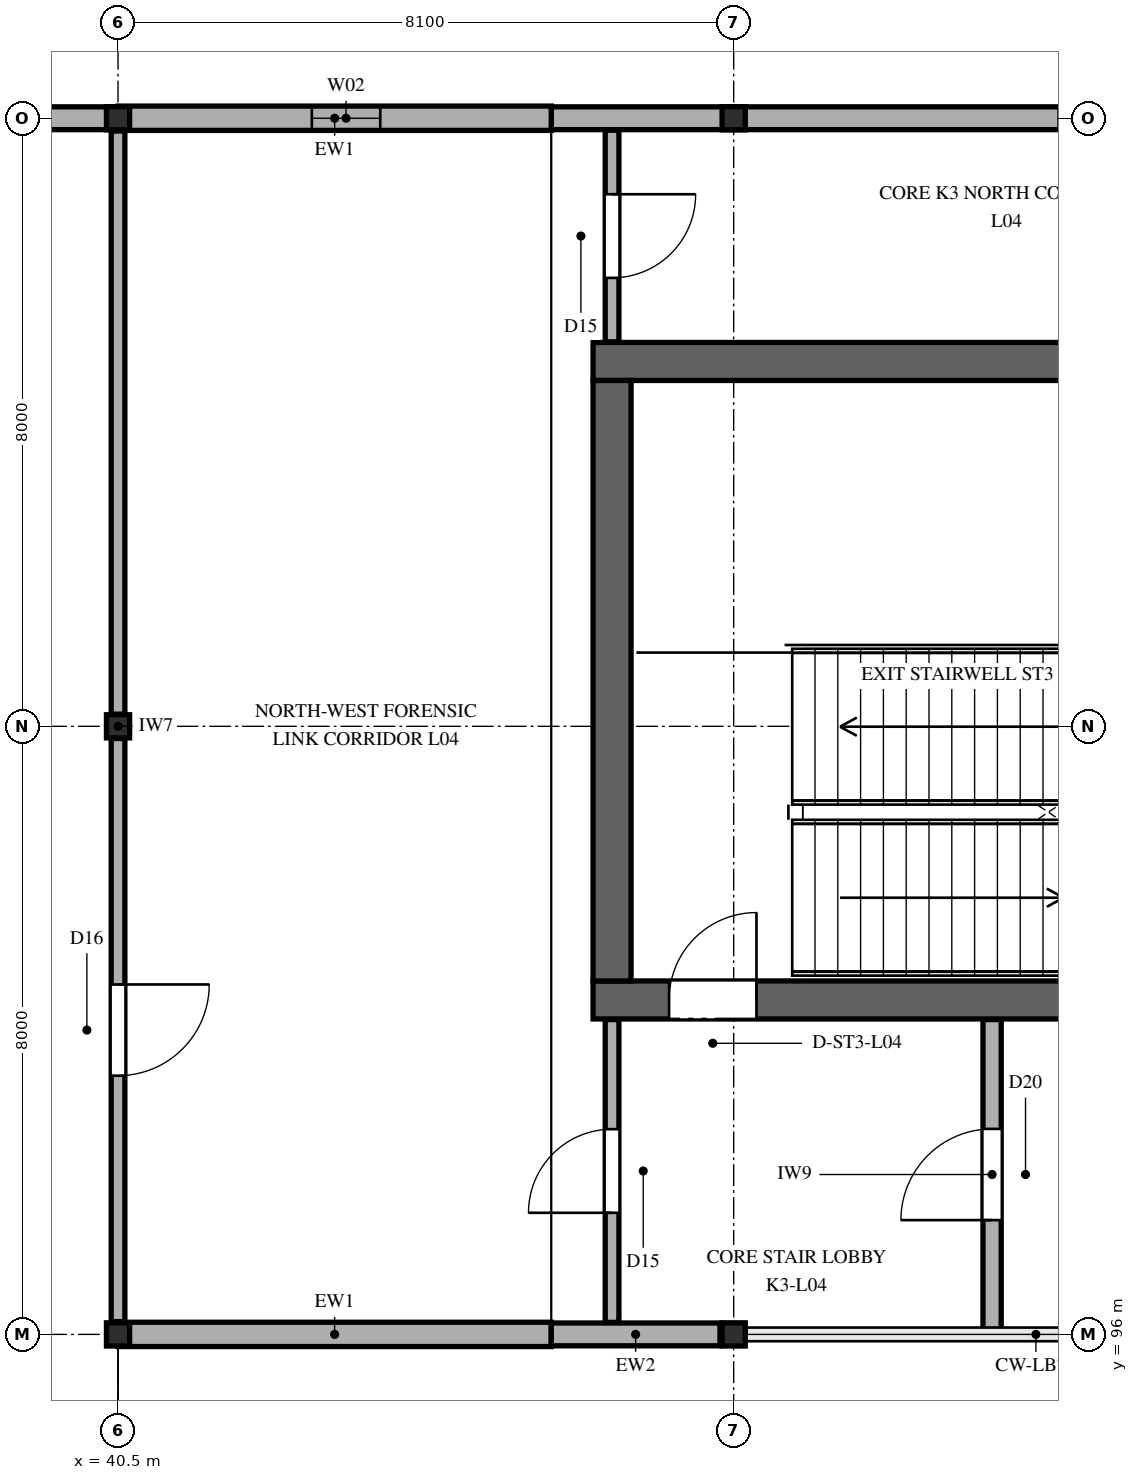
"""IFC4 building model, lengths in metres.
Left out: names, types, materials, properties, quantities, classifications, styles, units other than length and angle.
Written with IfcOpenShell. Run it as: python <this file> out.ifc"""

import sys

from ifc_helpers import new_model, si_unit, direction, frame, frame_2d, origin, origin_2d, place, context, subcontext, project, spatial, rectangle, hollow_rectangle, extrude, element, fill, save


model = new_model("IFC4")
c1 = context("Model", 3, precision=1e-05, world=origin(), true_north=direction((0.0, 1.0)))
c2 = subcontext(c1, "Body", "Model", "MODEL_VIEW")
j1 = project(units=[si_unit("LENGTHUNIT", "METRE"), si_unit("PLANEANGLEUNIT", "RADIAN")], contexts=[c1])
p1 = place(None, origin())
s1 = spatial("IfcSite", under=j1, at=p1, CompositionType="ELEMENT")
p2 = place(p1, origin())
s2 = spatial("IfcBuilding", under=s1, at=p2, CompositionType="ELEMENT")
p3 = place(p2, frame((0.0, 0.0, 19.8)))
s3 = spatial("IfcBuildingStorey", under=s2, at=p3, CompositionType="ELEMENT", Elevation=19.8)
p4 = place(p3, frame((46.75, 100.4, 0.0), z_axis=(0.0, 0.0, 1.0), x_axis=(1.0, 0.0, 0.0)))
e1 = element("IfcWall", 1, at=p4, inside=s3, PredefinedType="SHEAR", context=c2, shape_type="SweptSolid", body=[
    extrude(rectangle(XDim=15.3, YDim=0.5, at=frame_2d((7.65, 0.0))), origin(), (0.0, 0.0, 1.0), 5.1),
])
p5 = place(p4, frame((1.0, 0.0, 0.0)))
e2 = element("IfcOpeningElement", 2, at=p5, cuts=e1, PredefinedType="OPENING", context=c2, shape_type="SweptSolid", body=[
    extrude(rectangle(XDim=1.15, YDim=2.25, at=frame_2d((0.575, 1.125))), frame((0.0, 0.26, 0.0), z_axis=(0.0, -1.0, 0.0), x_axis=(1.0, 0.0, 0.0)), (0.0, 0.0, 1.0), 0.52),
])
p6 = place(p4, frame((10.282, 0.0, 0.0)))
e3 = element("IfcOpeningElement", 3, at=p6, cuts=e1, PredefinedType="OPENING", context=c2, shape_type="SweptSolid", body=[
    extrude(rectangle(XDim=1.1, YDim=2.2, at=frame_2d((0.55, 1.1))), frame((0.0, 0.26, 0.0), z_axis=(0.0, -1.0, 0.0), x_axis=(1.0, 0.0, 0.0)), (0.0, 0.0, 1.0), 0.52),
])
p7 = place(p4, frame((12.998, 0.0, 0.0)))
e4 = element("IfcOpeningElement", 4, at=p7, cuts=e1, PredefinedType="OPENING", context=c2, shape_type="SweptSolid", body=[
    extrude(rectangle(XDim=1.1, YDim=2.2, at=frame_2d((0.55, 1.1))), frame((0.0, 0.26, 0.0), z_axis=(0.0, -1.0, 0.0), x_axis=(1.0, 0.0, 0.0)), (0.0, 0.0, 1.0), 0.52),
])
p8 = place(p3, frame((46.75, 108.8, 0.0), z_axis=(0.0, 0.0, 1.0), x_axis=(1.0, 0.0, 0.0)))
e5 = element("IfcWall", 5, at=p8, inside=s3, PredefinedType="SHEAR", context=c2, shape_type="SweptSolid", body=[
    extrude(rectangle(XDim=15.3, YDim=0.5, at=frame_2d((7.65, 0.0))), origin(), (0.0, 0.0, 1.0), 5.1),
])
p9 = place(p3, frame((47.0, 100.65, 0.0), z_axis=(0.0, 0.0, 1.0), x_axis=(0.0, 1.0, 0.0)))
e6 = element("IfcWall", 6, at=p9, inside=s3, PredefinedType="SHEAR", context=c2, shape_type="SweptSolid", body=[
    extrude(rectangle(XDim=7.9, YDim=0.5, at=frame_2d((3.95, 0.0))), origin(), (0.0, 0.0, 1.0), 5.1),
])
for number, where, z_axis, x_axis in (
    (7, (40.5, 96.0, 0.0), (0.0, 0.0, 1.0), (1.0, 0.0, 0.0)),
    (8, (40.5, 104.0, 0.0), (0.0, 0.0, 1.0), (1.0, 0.0, 0.0)),
    (9, (40.5, 112.0, 0.0), (0.0, 0.0, 1.0), (1.0, 0.0, 0.0)),
    (10, (48.6, 96.0, 0.0), (0.0, 0.0, 1.0), (1.0, 0.0, 0.0)),
    (11, (48.6, 112.0, 0.0), (0.0, 0.0, 1.0), (1.0, 0.0, 0.0)),
):
    element("IfcColumn", number, at=place(p3, frame(where, z_axis=z_axis, x_axis=x_axis)), inside=s3, PredefinedType="COLUMN", context=c2, shape_type="SweptSolid", body=[
        extrude(hollow_rectangle(XDim=0.305, YDim=0.305, WallThickness=0.016, InnerFilletRadius=0.016, OuterFilletRadius=0.032, at=origin_2d()), origin(), (0.0, 0.0, 1.0), 5.1),
    ])
p10 = place(p3, frame((40.5, 96.0, 0.0), z_axis=(0.0, 0.0, 1.0), x_axis=(1.0, 0.0, 0.0)))
e12 = element("IfcWall", 12, at=p10, inside=s3, PredefinedType="SOLIDWALL", context=c2, shape_type="SweptSolid", body=[
    extrude(rectangle(XDim=5.7, YDim=0.32, at=frame_2d((2.85, 0.0))), origin(), (0.0, 0.0, 1.0), 4.302),
])
p11 = place(p3, frame((46.2, 96.0, 0.0), z_axis=(0.0, 0.0, 1.0), x_axis=(1.0, 0.0, 0.0)))
e13 = element("IfcWall", 13, at=p11, inside=s3, PredefinedType="SOLIDWALL", context=c2, shape_type="SweptSolid", body=[
    extrude(rectangle(XDim=2.22, YDim=0.3, at=frame_2d((1.11, 0.0))), origin(), (0.0, 0.0, 1.0), 4.302),
])
p12 = place(p3, frame((62.775, 112.0, 0.0), z_axis=(0.0, 0.0, 1.0), x_axis=(-1.0, 0.0, 0.0)))
e14 = element("IfcWall", 14, at=p12, inside=s3, PredefinedType="SOLIDWALL", context=c2, shape_type="SweptSolid", body=[
    extrude(rectangle(XDim=14.175, YDim=0.3, at=frame_2d((7.087, 0.0))), origin(), (0.0, 0.0, 1.0), 4.302),
])
p13 = place(p12, frame((9.0, 0.0, 0.95)))
e15 = element("IfcOpeningElement", 15, at=p13, cuts=e14, PredefinedType="OPENING", context=c2, shape_type="SweptSolid", body=[
    extrude(rectangle(XDim=0.9, YDim=1.8, at=frame_2d((0.45, 0.9))), frame((0.0, 0.16, 0.0), z_axis=(0.0, -1.0, 0.0), x_axis=(1.0, 0.0, 0.0)), (0.0, 0.0, 1.0), 0.32),
])
p14 = place(p3, frame((48.6, 112.0, 0.0), z_axis=(0.0, 0.0, 1.0), x_axis=(-1.0, 0.0, 0.0)))
e16 = element("IfcWall", 16, at=p14, inside=s3, PredefinedType="SOLIDWALL", context=c2, shape_type="SweptSolid", body=[
    extrude(rectangle(XDim=2.4, YDim=0.3, at=frame_2d((1.2, 0.0))), origin(), (0.0, 0.0, 1.0), 4.389),
])
p15 = place(p3, frame((46.2, 112.0, 0.0), z_axis=(0.0, 0.0, 1.0), x_axis=(-1.0, 0.0, 0.0)))
e17 = element("IfcWall", 17, at=p15, inside=s3, PredefinedType="SOLIDWALL", context=c2, shape_type="SweptSolid", body=[
    extrude(rectangle(XDim=5.7, YDim=0.32, at=frame_2d((2.85, 0.0))), origin(), (0.0, 0.0, 1.0), 4.389),
])
p16 = place(p15, frame((2.25, 0.0, 0.85)))
e18 = element("IfcOpeningElement", 18, at=p16, cuts=e17, PredefinedType="OPENING", context=c2, shape_type="SweptSolid", body=[
    extrude(rectangle(XDim=0.9, YDim=2.1, at=frame_2d((0.45, 1.05))), frame((0.0, 0.17, 0.0), z_axis=(0.0, -1.0, 0.0), x_axis=(1.0, 0.0, 0.0)), (0.0, 0.0, 1.0), 0.34),
])
p17 = place(p3, frame((40.5, 112.0, 0.0), z_axis=(0.0, 0.0, 1.0), x_axis=(-1.0, 0.0, 0.0)))
e19 = element("IfcWall", 19, at=p17, inside=s3, PredefinedType="SOLIDWALL", context=c2, shape_type="SweptSolid", body=[
    extrude(rectangle(XDim=12.15, YDim=0.3, at=frame_2d((6.075, 0.0))), origin(), (0.0, 0.0, 1.0), 4.302),
])
p18 = place(p17, frame((5.4, 0.0, 0.85)))
e20 = element("IfcOpeningElement", 20, at=p18, cuts=e19, PredefinedType="OPENING", context=c2, shape_type="SweptSolid", body=[
    extrude(rectangle(XDim=0.9, YDim=2.4, at=frame_2d((0.45, 1.2))), frame((0.0, 0.16, 0.0), z_axis=(0.0, -1.0, 0.0), x_axis=(1.0, 0.0, 0.0)), (0.0, 0.0, 1.0), 0.32),
])
p19 = place(p3, frame((40.5, 96.168, 0.0), z_axis=(0.0, 0.0, 1.0), x_axis=(0.0, 1.0, 0.0)))
e21 = element("IfcWall", 21, at=p19, inside=s3, PredefinedType="PARTITIONING", context=c2, shape_type="SweptSolid", body=[
    extrude(rectangle(XDim=7.672, YDim=0.18, at=frame_2d((3.836, 0.0))), origin(), (0.0, 0.0, 1.0), 4.389),
])
p20 = place(p19, frame((3.236, 0.0, 0.0)))
e22 = element("IfcOpeningElement", 22, at=p20, cuts=e21, PredefinedType="OPENING", context=c2, shape_type="SweptSolid", body=[
    extrude(rectangle(XDim=1.2, YDim=2.2, at=frame_2d((0.6, 1.1))), frame((0.0, 0.1, 0.0), z_axis=(0.0, -1.0, 0.0), x_axis=(1.0, 0.0, 0.0)), (0.0, 0.0, 1.0), 0.2),
])
p21 = place(p3, frame((40.5, 104.16, 0.0), z_axis=(0.0, 0.0, 1.0), x_axis=(0.0, 1.0, 0.0)))
e23 = element("IfcWall", 23, at=p21, inside=s3, PredefinedType="PARTITIONING", context=c2, shape_type="SweptSolid", body=[
    extrude(rectangle(XDim=7.672, YDim=0.18, at=frame_2d((3.836, 0.0))), origin(), (0.0, 0.0, 1.0), 4.389),
])
p22 = place(p3, frame((47.0, 96.158, 0.0), z_axis=(0.0, 0.0, 1.0), x_axis=(0.0, 1.0, 0.0)))
e24 = element("IfcWall", 24, at=p22, inside=s3, PredefinedType="PARTITIONING", context=c2, shape_type="SweptSolid", body=[
    extrude(rectangle(XDim=3.984, YDim=0.18, at=frame_2d((1.992, 0.0))), origin(), (0.0, 0.0, 1.0), 4.86),
])
p23 = place(p22, frame((1.442, 0.0, 0.0)))
e25 = element("IfcOpeningElement", 25, at=p23, cuts=e24, PredefinedType="OPENING", context=c2, shape_type="SweptSolid", body=[
    extrude(rectangle(XDim=1.1, YDim=2.2, at=frame_2d((0.55, 1.1))), frame((0.0, 0.1, 0.0), z_axis=(0.0, -1.0, 0.0), x_axis=(1.0, 0.0, 0.0)), (0.0, 0.0, 1.0), 0.2),
])
p24 = place(p3, frame((47.0, 109.058, 0.0), z_axis=(0.0, 0.0, 1.0), x_axis=(0.0, 1.0, 0.0)))
e26 = element("IfcWall", 26, at=p24, inside=s3, PredefinedType="PARTITIONING", context=c2, shape_type="SweptSolid", body=[
    extrude(rectangle(XDim=2.784, YDim=0.18, at=frame_2d((1.392, 0.0))), origin(), (0.0, 0.0, 1.0), 4.86),
])
p25 = place(p24, frame((0.842, 0.0, 0.0)))
e27 = element("IfcOpeningElement", 27, at=p25, cuts=e26, PredefinedType="OPENING", context=c2, shape_type="SweptSolid", body=[
    extrude(rectangle(XDim=1.1, YDim=2.2, at=frame_2d((0.55, 1.1))), frame((0.0, 0.1, 0.0), z_axis=(0.0, -1.0, 0.0), x_axis=(1.0, 0.0, 0.0)), (0.0, 0.0, 1.0), 0.2),
])
p26 = place(p3, frame((52.0, 96.065, 0.0), z_axis=(0.0, 0.0, 1.0), x_axis=(0.0, 1.0, 0.0)))
e28 = element("IfcWall", 28, at=p26, inside=s3, PredefinedType="PARTITIONING", context=c2, shape_type="SweptSolid", body=[
    extrude(rectangle(XDim=4.077, YDim=0.24, at=frame_2d((2.039, 0.0))), origin(), (0.0, 0.0, 1.0), 4.86),
])
p27 = place(p26, frame((1.438, 0.0, 0.0)))
e29 = element("IfcOpeningElement", 29, at=p27, cuts=e28, PredefinedType="OPENING", context=c2, shape_type="SweptSolid", body=[
    extrude(rectangle(XDim=1.2, YDim=2.3, at=frame_2d((0.6, 1.15))), frame((0.0, 0.13, 0.0), z_axis=(0.0, -1.0, 0.0), x_axis=(1.0, 0.0, 0.0)), (0.0, 0.0, 1.0), 0.26),
])
p28 = place(p16, origin())
e30 = element("IfcWindow", 30, at=p28, inside=s3, PartitioningType="SINGLE_PANEL", PredefinedType="WINDOW", context=c2, shape_type="SweptSolid", body=[
    extrude(rectangle(XDim=0.9, YDim=2.1, at=frame_2d((0.45, 1.05))), frame((0.0, 0.03, 0.0), z_axis=(0.0, -1.0, 0.0), x_axis=(1.0, 0.0, 0.0)), (0.0, 0.0, 1.0), 0.06),
])
fill(e18, e30)
p29 = place(p5, origin())
e31 = element("IfcDoor", 31, at=p29, inside=s3, OperationType="SINGLE_SWING_RIGHT", PredefinedType="DOOR", context=c2, shape_type="SweptSolid", body=[
    extrude(rectangle(XDim=1.15, YDim=2.25, at=frame_2d((0.575, 1.125))), frame((0.0, 0.025, 0.0), z_axis=(0.0, -1.0, 0.0), x_axis=(1.0, 0.0, 0.0)), (0.0, 0.0, 1.0), 0.05),
])
fill(e2, e31)
p30 = place(p20, frame((1.2, 0.0, 0.0), z_axis=(0.0, 0.0, 1.0), x_axis=(-1.0, 0.0, 0.0)))
e32 = element("IfcDoor", 32, at=p30, inside=s3, OperationType="SINGLE_SWING_RIGHT", PredefinedType="DOOR", context=c2, shape_type="SweptSolid", body=[
    extrude(rectangle(XDim=1.2, YDim=2.2, at=frame_2d((0.6, 1.1))), frame((0.0, 0.025, 0.0), z_axis=(0.0, -1.0, 0.0), x_axis=(1.0, 0.0, 0.0)), (0.0, 0.0, 1.0), 0.05),
])
fill(e22, e32)
p31 = place(p23, origin())
e33 = element("IfcDoor", 33, at=p31, inside=s3, OperationType="SINGLE_SWING_LEFT", PredefinedType="DOOR", context=c2, shape_type="SweptSolid", body=[
    extrude(rectangle(XDim=1.1, YDim=2.2, at=frame_2d((0.55, 1.1))), frame((0.0, 0.025, 0.0), z_axis=(0.0, -1.0, 0.0), x_axis=(1.0, 0.0, 0.0)), (0.0, 0.0, 1.0), 0.05),
])
fill(e25, e33)
p32 = place(p25, frame((1.1, 0.0, 0.0), z_axis=(0.0, 0.0, 1.0), x_axis=(-1.0, 0.0, 0.0)))
e34 = element("IfcDoor", 34, at=p32, inside=s3, OperationType="SINGLE_SWING_RIGHT", PredefinedType="DOOR", context=c2, shape_type="SweptSolid", body=[
    extrude(rectangle(XDim=1.1, YDim=2.2, at=frame_2d((0.55, 1.1))), frame((0.0, 0.025, 0.0), z_axis=(0.0, -1.0, 0.0), x_axis=(1.0, 0.0, 0.0)), (0.0, 0.0, 1.0), 0.05),
])
fill(e27, e34)
p33 = place(p27, origin())
e35 = element("IfcDoor", 35, at=p33, inside=s3, OperationType="SINGLE_SWING_LEFT", PredefinedType="DOOR", context=c2, shape_type="SweptSolid", body=[
    extrude(rectangle(XDim=1.2, YDim=2.3, at=frame_2d((0.6, 1.15))), frame((0.0, 0.025, 0.0), z_axis=(0.0, -1.0, 0.0), x_axis=(1.0, 0.0, 0.0)), (0.0, 0.0, 1.0), 0.05),
])
fill(e29, e35)
save(model, sys.argv[1])
